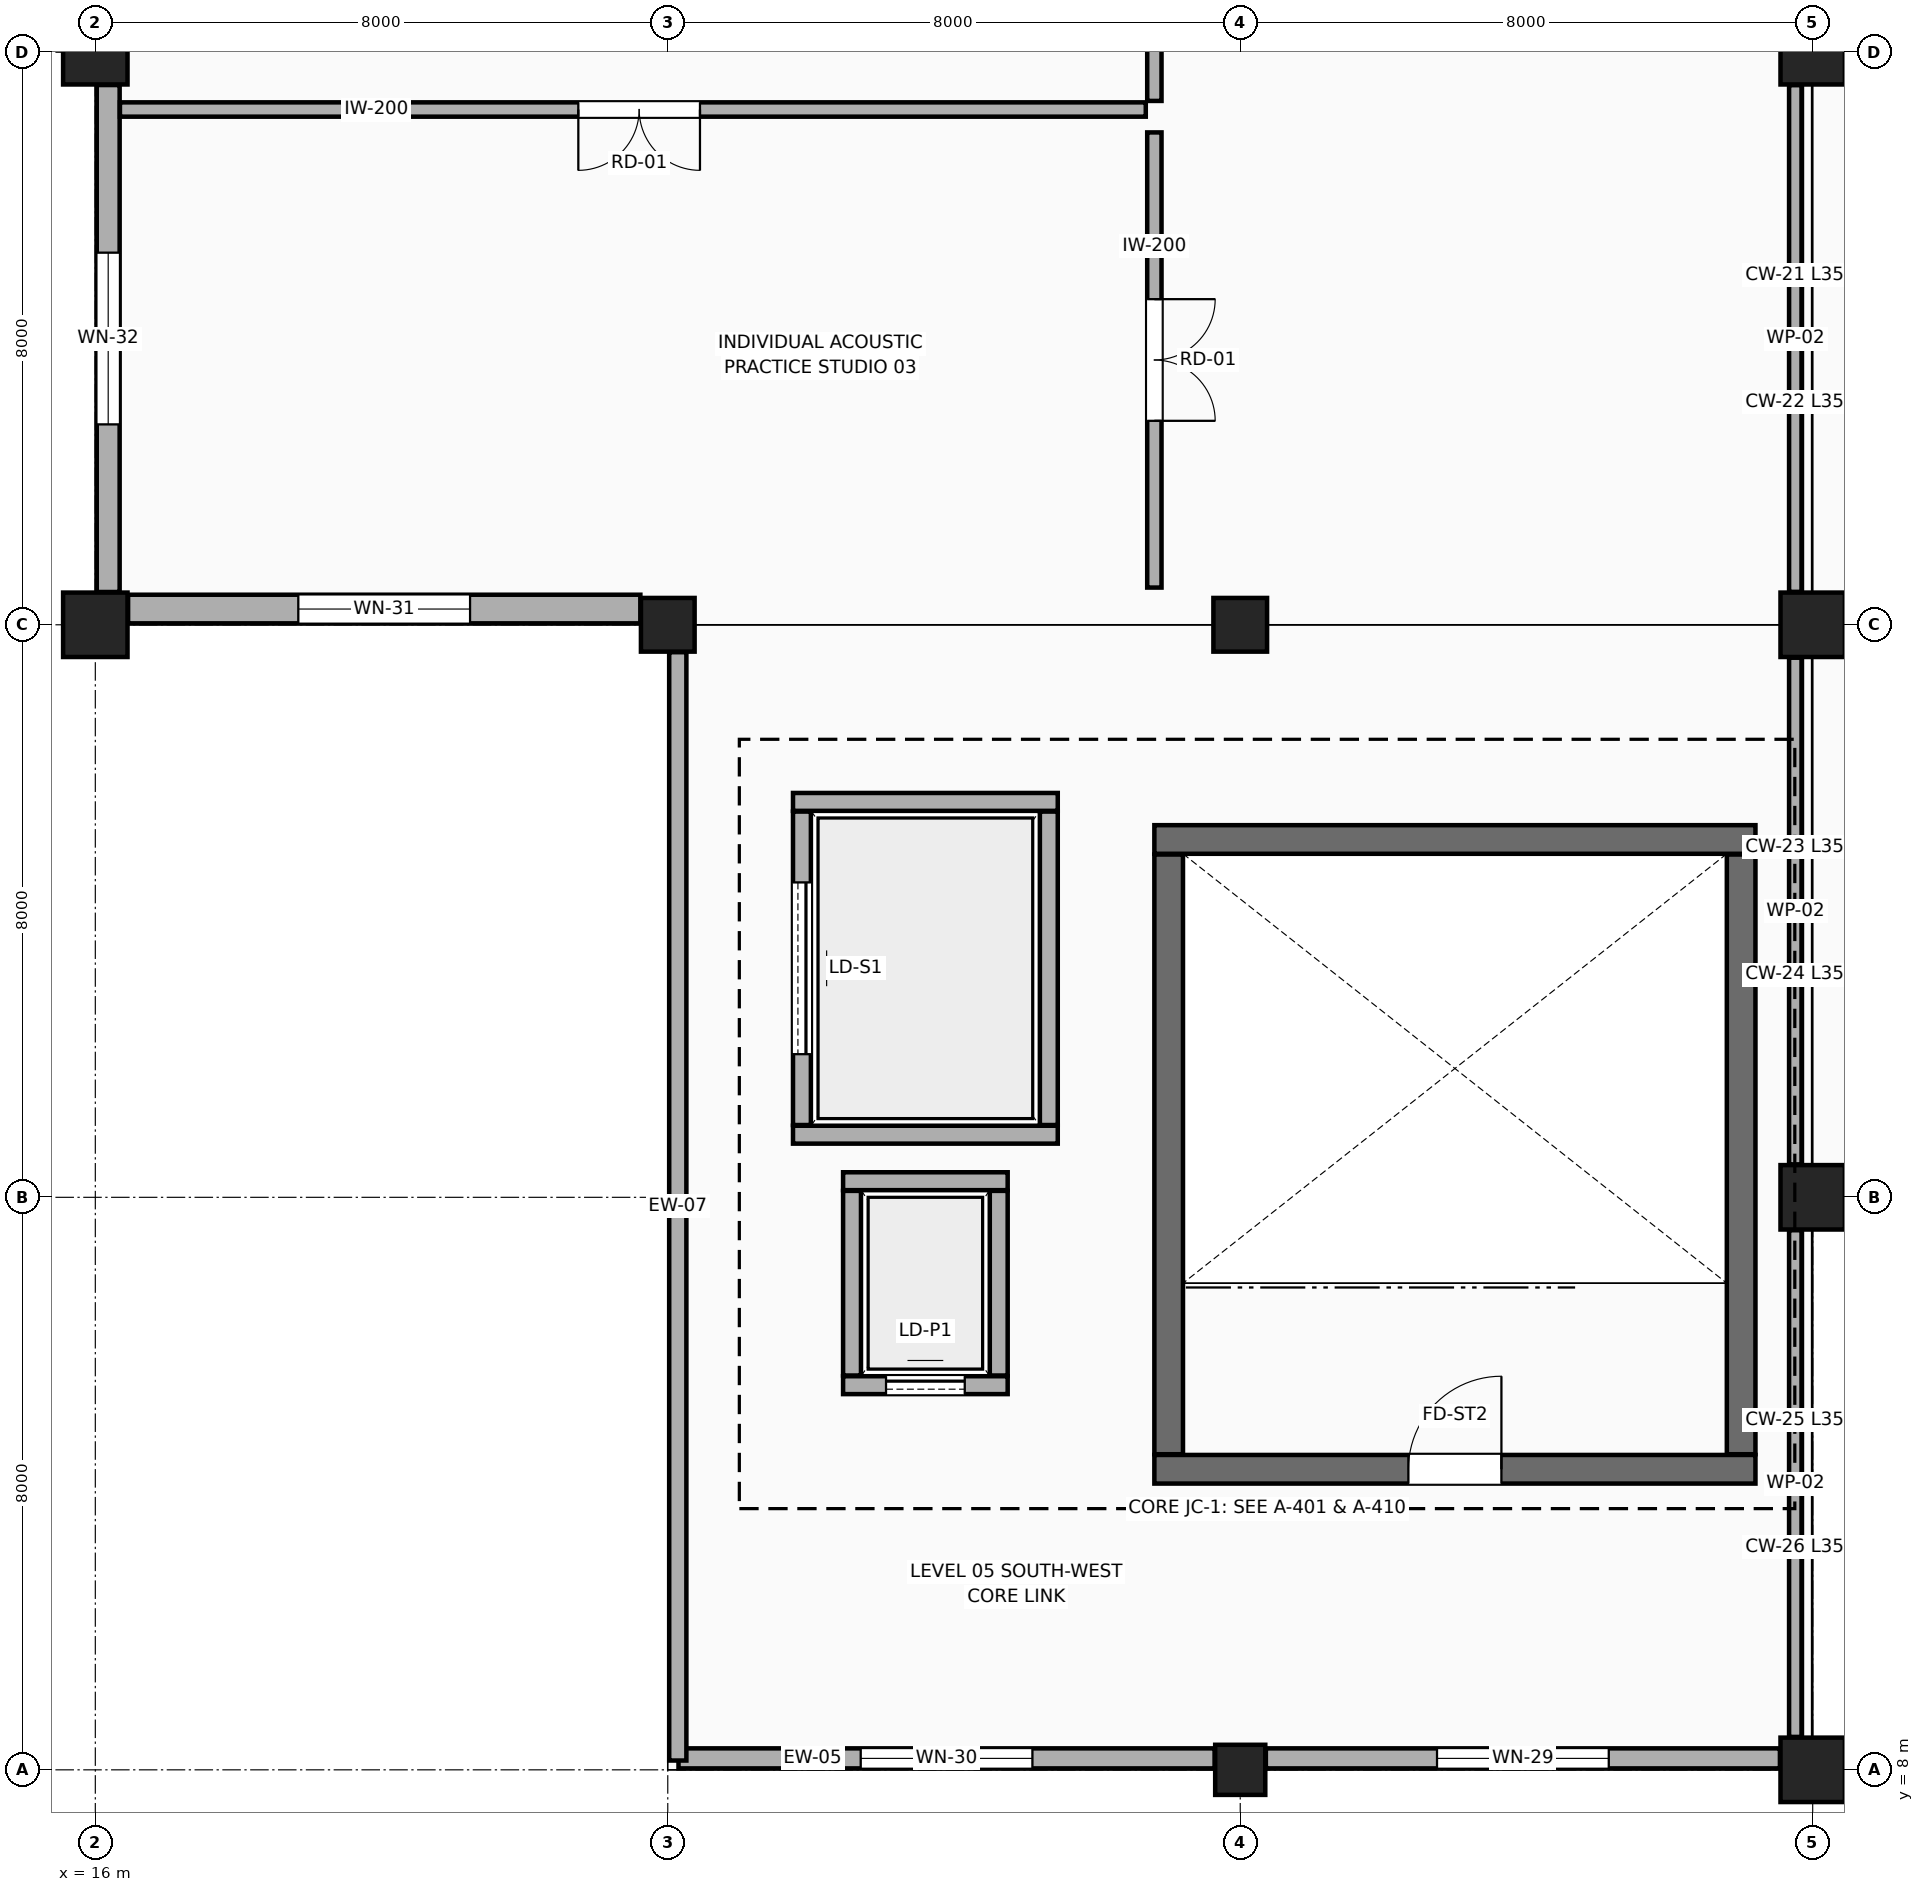
"""IFC4 building model, lengths in metres.
Left out: names, types, materials, properties, quantities, classifications, styles, units other than length and angle.
Written with IfcOpenShell. Run it as: python <this file> out.ifc"""

import sys

from ifc_helpers import new_model, si_unit, direction, frame, frame_2d, origin, origin_2d, place, context, subcontext, project, spatial, rectangle, circle, extrude, element, fill, save


model = new_model("IFC4")
c1 = context("Model", 3, precision=1e-05, world=origin(), true_north=direction((0.0, 1.0)))
c2 = subcontext(c1, "Body", "Model", "MODEL_VIEW")
j1 = project(units=[si_unit("LENGTHUNIT", "METRE"), si_unit("PLANEANGLEUNIT", "RADIAN")], contexts=[c1])
p1 = place(None, origin())
s1 = spatial("IfcSite", under=j1, at=p1, CompositionType="ELEMENT")
p2 = place(p1, origin())
s2 = spatial("IfcBuilding", under=s1, at=p2, CompositionType="ELEMENT")
p3 = place(p2, frame((0.0, 0.0, 19.8)))
s3 = spatial("IfcBuildingStorey", under=s2, at=p3, CompositionType="ELEMENT", Elevation=19.8)
for number, where, z_axis, x_axis in (
    (1, (16.0, 24.0, 0.0), (0.0, 0.0, 1.0), (1.0, 0.0, 0.0)),
    (2, (16.0, 32.0, 0.0), (0.0, 0.0, 1.0), (1.0, 0.0, 0.0)),
):
    element("IfcColumn", number, at=place(p3, frame(where, z_axis=z_axis, x_axis=x_axis)), inside=s3, PredefinedType="COLUMN", context=c2, shape_type="SweptSolid", body=[
        extrude(rectangle(XDim=0.9, YDim=0.9, at=origin_2d()), origin(), (0.0, 0.0, 1.0), 4.5),
    ])
p4 = place(p3, frame((24.0, 24.0, 0.0), z_axis=(0.0, 0.0, 1.0), x_axis=(1.0, 0.0, 0.0)))
e3 = element("IfcColumn", 3, at=p4, inside=s3, PredefinedType="COLUMN", context=c2, shape_type="SweptSolid", body=[
    extrude(rectangle(XDim=0.75, YDim=0.75, at=origin_2d()), origin(), (0.0, 0.0, 1.0), 4.5),
])
p5 = place(p3, frame((32.0, 8.0, 0.0), z_axis=(0.0, 0.0, 1.0), x_axis=(1.0, 0.0, 0.0)))
e4 = element("IfcColumn", 4, at=p5, inside=s3, PredefinedType="COLUMN", context=c2, shape_type="SweptSolid", body=[
    extrude(circle(Radius=0.35, at=origin_2d()), origin(), (0.0, 0.0, 1.0), 4.46),
])
p6 = place(p3, frame((32.0, 24.0, 0.0), z_axis=(0.0, 0.0, 1.0), x_axis=(1.0, 0.0, 0.0)))
e5 = element("IfcColumn", 5, at=p6, inside=s3, PredefinedType="COLUMN", context=c2, shape_type="SweptSolid", body=[
    extrude(rectangle(XDim=0.75, YDim=0.75, at=origin_2d()), origin(), (0.0, 0.0, 1.0), 4.5),
])
for number, where, z_axis, x_axis in (
    (6, (40.0, 8.0, 0.0), (0.0, 0.0, 1.0), (1.0, 0.0, 0.0)),
    (7, (40.0, 16.0, 0.0), (0.0, 0.0, 1.0), (1.0, 0.0, 0.0)),
):
    element("IfcColumn", number, at=place(p3, frame(where, z_axis=z_axis, x_axis=x_axis)), inside=s3, PredefinedType="COLUMN", context=c2, shape_type="SweptSolid", body=[
        extrude(rectangle(XDim=0.9, YDim=0.9, at=origin_2d()), origin(), (0.0, 0.0, 1.0), 4.46),
    ])
for number, where, z_axis, x_axis in (
    (8, (40.0, 24.0, 0.0), (0.0, 0.0, 1.0), (1.0, 0.0, 0.0)),
    (9, (40.0, 32.0, 0.0), (0.0, 0.0, 1.0), (1.0, 0.0, 0.0)),
):
    element("IfcColumn", number, at=place(p3, frame(where, z_axis=z_axis, x_axis=x_axis)), inside=s3, PredefinedType="COLUMN", context=c2, shape_type="SweptSolid", body=[
        extrude(rectangle(XDim=0.9, YDim=0.9, at=origin_2d()), origin(), (0.0, 0.0, 1.0), 4.5),
    ])
for number, where, z_axis, x_axis in (
    (10, (39.76, 31.54, 0.0), (0.0, 0.0, 1.0), (0.0, -1.0, 0.0)),
    (11, (39.76, 23.54, 0.0), (0.0, 0.0, 1.0), (0.0, -1.0, 0.0)),
    (12, (39.76, 15.54, 0.0), (0.0, 0.0, 1.0), (0.0, -1.0, 0.0)),
):
    element("IfcWall", number, at=place(p3, frame(where, z_axis=z_axis, x_axis=x_axis)), inside=s3, PredefinedType="PARAPET", context=c2, shape_type="SweptSolid", body=[
        extrude(rectangle(XDim=7.08, YDim=0.18, at=frame_2d((3.54, 0.0))), origin(), (0.0, 0.0, 1.0), 0.88),
    ])
p7 = place(p3, frame((39.542, 8.16, 0.0), z_axis=(0.0, 0.0, 1.0), x_axis=(-1.0, 0.0, 0.0)))
e13 = element("IfcWall", 13, at=p7, inside=s3, PredefinedType="STANDARD", context=c2, shape_type="SweptSolid", body=[
    extrude(rectangle(XDim=7.184, YDim=0.28, at=frame_2d((3.592, 0.0))), origin(), (0.0, 0.0, 1.0), 3.485),
])
p8 = place(p7, frame((2.392, 0.0, 0.95)))
e14 = element("IfcOpeningElement", 14, at=p8, cuts=e13, PredefinedType="OPENING", context=c2, shape_type="SweptSolid", body=[
    extrude(rectangle(XDim=2.4, YDim=1.2, at=frame_2d((1.2, 0.6))), frame((0.0, 0.15, 0.0), z_axis=(0.0, -1.0, 0.0), x_axis=(1.0, 0.0, 0.0)), (0.0, 0.0, 1.0), 0.3),
])
p9 = place(p3, frame((31.642, 8.16, 0.0), z_axis=(0.0, 0.0, 1.0), x_axis=(-1.0, 0.0, 0.0)))
e15 = element("IfcWall", 15, at=p9, inside=s3, PredefinedType="STANDARD", context=c2, shape_type="SweptSolid", body=[
    extrude(rectangle(XDim=7.492, YDim=0.28, at=frame_2d((3.746, 0.0))), origin(), (0.0, 0.0, 1.0), 4.28),
])
p10 = place(p9, frame((2.546, 0.0, 0.95)))
e16 = element("IfcOpeningElement", 16, at=p10, cuts=e15, PredefinedType="OPENING", context=c2, shape_type="SweptSolid", body=[
    extrude(rectangle(XDim=2.4, YDim=1.5, at=frame_2d((1.2, 0.75))), frame((0.0, 0.15, 0.0), z_axis=(0.0, -1.0, 0.0), x_axis=(1.0, 0.0, 0.0)), (0.0, 0.0, 1.0), 0.3),
])
p11 = place(p3, frame((24.14, 8.13, 0.0), z_axis=(0.0, 0.0, 1.0), x_axis=(0.0, 1.0, 0.0)))
e17 = element("IfcWall", 17, at=p11, inside=s3, PredefinedType="ELEMENTEDWALL", context=c2, shape_type="SweptSolid", body=[
    extrude(rectangle(XDim=15.487, YDim=0.24, at=frame_2d((7.744, 0.0))), origin(), (0.0, 0.0, 1.0), 4.28),
])
p12 = place(p3, frame((23.617, 24.22, 0.0), z_axis=(0.0, 0.0, 1.0), x_axis=(-1.0, 0.0, 0.0)))
e18 = element("IfcWall", 18, at=p12, inside=s3, PredefinedType="STANDARD", context=c2, shape_type="SweptSolid", body=[
    extrude(rectangle(XDim=7.159, YDim=0.4, at=frame_2d((3.58, 0.0))), origin(), (0.0, 0.0, 1.0), 3.735),
])
p13 = place(p12, frame((2.38, 0.0, 0.95)))
e19 = element("IfcOpeningElement", 19, at=p13, cuts=e18, PredefinedType="OPENING", context=c2, shape_type="SweptSolid", body=[
    extrude(rectangle(XDim=2.4, YDim=1.8, at=frame_2d((1.2, 0.9))), frame((0.0, 0.21, 0.0), z_axis=(0.0, -1.0, 0.0), x_axis=(1.0, 0.0, 0.0)), (0.0, 0.0, 1.0), 0.42),
])
p14 = place(p3, frame((16.18, 24.458, 0.0), z_axis=(0.0, 0.0, 1.0), x_axis=(0.0, 1.0, 0.0)))
e20 = element("IfcWall", 20, at=p14, inside=s3, PredefinedType="STANDARD", context=c2, shape_type="SweptSolid", body=[
    extrude(rectangle(XDim=7.084, YDim=0.32, at=frame_2d((3.542, 0.0))), origin(), (0.0, 0.0, 1.0), 3.635),
])
p15 = place(p14, frame((2.342, 0.0, 0.95)))
e21 = element("IfcOpeningElement", 21, at=p15, cuts=e20, PredefinedType="OPENING", context=c2, shape_type="SweptSolid", body=[
    extrude(rectangle(XDim=2.4, YDim=2.1, at=frame_2d((1.2, 1.05))), frame((0.0, 0.17, 0.0), z_axis=(0.0, -1.0, 0.0), x_axis=(1.0, 0.0, 0.0)), (0.0, 0.0, 1.0), 0.34),
])
p16 = place(p3, frame((30.8, 12.2, 0.0), z_axis=(0.0, 0.0, 1.0), x_axis=(1.0, 0.0, 0.0)))
e22 = element("IfcWall", 22, at=p16, inside=s3, PredefinedType="SHEAR", context=c2, shape_type="SweptSolid", body=[
    extrude(rectangle(XDim=8.4, YDim=0.4, at=frame_2d((4.2, 0.0))), origin(), (0.0, 0.0, 1.0), 4.28),
])
p17 = place(p16, frame((3.55, 0.0, 0.0)))
e23 = element("IfcOpeningElement", 23, at=p17, cuts=e22, PredefinedType="OPENING", context=c2, shape_type="SweptSolid", body=[
    extrude(rectangle(XDim=1.3, YDim=2.15, at=frame_2d((0.65, 1.075))), frame((0.0, 0.21, 0.0), z_axis=(0.0, -1.0, 0.0), x_axis=(1.0, 0.0, 0.0)), (0.0, 0.0, 1.0), 0.42),
])
p18 = place(p3, frame((39.2, 21.0, 0.0), z_axis=(0.0, 0.0, 1.0), x_axis=(-1.0, 0.0, 0.0)))
e24 = element("IfcWall", 24, at=p18, inside=s3, PredefinedType="SHEAR", context=c2, shape_type="SweptSolid", body=[
    extrude(rectangle(XDim=8.4, YDim=0.4, at=frame_2d((4.2, 0.0))), origin(), (0.0, 0.0, 1.0), 4.28),
])
for number, where, z_axis, x_axis in (
    (25, (39.0, 12.41, 0.0), (0.0, 0.0, 1.0), (0.0, 1.0, 0.0)),
    (26, (31.0, 20.79, 0.0), (0.0, 0.0, 1.0), (0.0, -1.0, 0.0)),
):
    element("IfcWall", number, at=place(p3, frame(where, z_axis=z_axis, x_axis=x_axis)), inside=s3, PredefinedType="SHEAR", context=c2, shape_type="SweptSolid", body=[
        extrude(rectangle(XDim=8.38, YDim=0.4, at=frame_2d((4.19, 0.0))), origin(), (0.0, 0.0, 1.0), 4.28),
    ])
p19 = place(p3, frame((26.45, 13.375, 0.0), z_axis=(0.0, 0.0, 1.0), x_axis=(1.0, 0.0, 0.0)))
e27 = element("IfcWall", 27, at=p19, inside=s3, PredefinedType="STANDARD", context=c2, shape_type="SweptSolid", body=[
    extrude(rectangle(XDim=2.3, YDim=0.25, at=frame_2d((1.15, 0.0))), origin(), (0.0, 0.0, 1.0), 4.27),
])
p20 = place(p19, frame((0.6, 0.0, 0.0)))
e28 = element("IfcOpeningElement", 28, at=p20, cuts=e27, PredefinedType="OPENING", context=c2, shape_type="SweptSolid", body=[
    extrude(rectangle(XDim=1.1, YDim=2.15, at=frame_2d((0.55, 1.075))), frame((0.0, 0.135, 0.0), z_axis=(0.0, -1.0, 0.0), x_axis=(1.0, 0.0, 0.0)), (0.0, 0.0, 1.0), 0.27),
])
p21 = place(p3, frame((28.75, 16.225, 0.0), z_axis=(0.0, 0.0, 1.0), x_axis=(-1.0, 0.0, 0.0)))
e29 = element("IfcWall", 29, at=p21, inside=s3, PredefinedType="STANDARD", context=c2, shape_type="SweptSolid", body=[
    extrude(rectangle(XDim=2.3, YDim=0.25, at=frame_2d((1.15, 0.0))), origin(), (0.0, 0.0, 1.0), 4.27),
])
for number, where, z_axis, x_axis in (
    (30, (28.625, 13.51, 0.0), (0.0, 0.0, 1.0), (0.0, 1.0, 0.0)),
    (31, (26.575, 16.09, 0.0), (0.0, 0.0, 1.0), (0.0, -1.0, 0.0)),
):
    element("IfcWall", number, at=place(p3, frame(where, z_axis=z_axis, x_axis=x_axis)), inside=s3, PredefinedType="STANDARD", context=c2, shape_type="SweptSolid", body=[
        extrude(rectangle(XDim=2.58, YDim=0.25, at=frame_2d((1.29, 0.0))), origin(), (0.0, 0.0, 1.0), 4.27),
    ])
for number, where, z_axis, x_axis in (
    (32, (25.75, 16.875, 0.0), (0.0, 0.0, 1.0), (1.0, 0.0, 0.0)),
    (33, (29.45, 21.525, 0.0), (0.0, 0.0, 1.0), (-1.0, 0.0, 0.0)),
):
    element("IfcWall", number, at=place(p3, frame(where, z_axis=z_axis, x_axis=x_axis)), inside=s3, PredefinedType="STANDARD", context=c2, shape_type="SweptSolid", body=[
        extrude(rectangle(XDim=3.7, YDim=0.25, at=frame_2d((1.85, 0.0))), origin(), (0.0, 0.0, 1.0), 4.27),
    ])
p22 = place(p3, frame((29.325, 17.01, 0.0), z_axis=(0.0, 0.0, 1.0), x_axis=(0.0, 1.0, 0.0)))
e34 = element("IfcWall", 34, at=p22, inside=s3, PredefinedType="STANDARD", context=c2, shape_type="SweptSolid", body=[
    extrude(rectangle(XDim=4.38, YDim=0.25, at=frame_2d((2.19, 0.0))), origin(), (0.0, 0.0, 1.0), 4.27),
])
p23 = place(p3, frame((25.875, 21.39, 0.0), z_axis=(0.0, 0.0, 1.0), x_axis=(0.0, -1.0, 0.0)))
e35 = element("IfcWall", 35, at=p23, inside=s3, PredefinedType="STANDARD", context=c2, shape_type="SweptSolid", body=[
    extrude(rectangle(XDim=4.38, YDim=0.25, at=frame_2d((2.19, 0.0))), origin(), (0.0, 0.0, 1.0), 4.27),
])
p24 = place(p23, frame((0.99, 0.0, 0.0)))
e36 = element("IfcOpeningElement", 36, at=p24, cuts=e35, PredefinedType="OPENING", context=c2, shape_type="SweptSolid", body=[
    extrude(rectangle(XDim=2.4, YDim=2.55, at=frame_2d((1.2, 1.275))), frame((0.0, 0.135, 0.0), z_axis=(0.0, -1.0, 0.0), x_axis=(1.0, 0.0, 0.0)), (0.0, 0.0, 1.0), 0.27),
])
p25 = place(p3, frame((30.8, 50.48, 0.0), z_axis=(0.0, 0.0, 1.0), x_axis=(0.0, -1.0, 0.0)))
e37 = element("IfcWall", 37, at=p25, inside=s3, PredefinedType="PARTITIONING", context=c2, shape_type="SweptSolid", body=[
    extrude(rectangle(XDim=19.16, YDim=0.2, at=frame_2d((9.58, 0.0))), origin(), (0.0, 0.0, 1.0), 4.5),
])
p26 = place(p25, frame((8.73, 0.0, 0.0)))
e38 = element("IfcOpeningElement", 38, at=p26, cuts=e37, PredefinedType="OPENING", context=c2, shape_type="SweptSolid", body=[
    extrude(rectangle(XDim=1.7, YDim=2.25, at=frame_2d((0.85, 1.125))), frame((0.0, 0.11, 0.0), z_axis=(0.0, -1.0, 0.0), x_axis=(1.0, 0.0, 0.0)), (0.0, 0.0, 1.0), 0.22),
])
p27 = place(p3, frame((30.68, 31.2, 0.0), z_axis=(0.0, 0.0, 1.0), x_axis=(-1.0, 0.0, 0.0)))
e39 = element("IfcWall", 39, at=p27, inside=s3, PredefinedType="PARTITIONING", context=c2, shape_type="SweptSolid", body=[
    extrude(rectangle(XDim=14.336, YDim=0.2, at=frame_2d((7.168, 0.0))), origin(), (0.0, 0.0, 1.0), 4.5),
])
p28 = place(p27, frame((6.23, 0.0, 0.0)))
e40 = element("IfcOpeningElement", 40, at=p28, cuts=e39, PredefinedType="OPENING", context=c2, shape_type="SweptSolid", body=[
    extrude(rectangle(XDim=1.7, YDim=2.25, at=frame_2d((0.85, 1.125))), frame((0.0, 0.11, 0.0), z_axis=(0.0, -1.0, 0.0), x_axis=(1.0, 0.0, 0.0)), (0.0, 0.0, 1.0), 0.22),
])
p29 = place(p3, frame((30.8, 30.88, 0.0), z_axis=(0.0, 0.0, 1.0), x_axis=(0.0, -1.0, 0.0)))
e41 = element("IfcWall", 41, at=p29, inside=s3, PredefinedType="PARTITIONING", context=c2, shape_type="SweptSolid", body=[
    extrude(rectangle(XDim=6.36, YDim=0.2, at=frame_2d((3.18, 0.0))), origin(), (0.0, 0.0, 1.0), 4.5),
])
p30 = place(p29, frame((2.33, 0.0, 0.0)))
e42 = element("IfcOpeningElement", 42, at=p30, cuts=e41, PredefinedType="OPENING", context=c2, shape_type="SweptSolid", body=[
    extrude(rectangle(XDim=1.7, YDim=2.25, at=frame_2d((0.85, 1.125))), frame((0.0, 0.11, 0.0), z_axis=(0.0, -1.0, 0.0), x_axis=(1.0, 0.0, 0.0)), (0.0, 0.0, 1.0), 0.22),
])
p31 = place(p8, origin())
e43 = element("IfcWindow", 43, at=p31, inside=s3, PartitioningType="SINGLE_PANEL", PredefinedType="SKYLIGHT", context=c2, shape_type="SweptSolid", body=[
    extrude(rectangle(XDim=2.4, YDim=1.2, at=frame_2d((1.2, 0.6))), frame((0.0, 0.03, 0.0), z_axis=(0.0, -1.0, 0.0), x_axis=(1.0, 0.0, 0.0)), (0.0, 0.0, 1.0), 0.06),
])
fill(e14, e43)
p32 = place(p10, origin())
e44 = element("IfcWindow", 44, at=p32, inside=s3, PartitioningType="SINGLE_PANEL", PredefinedType="SKYLIGHT", context=c2, shape_type="SweptSolid", body=[
    extrude(rectangle(XDim=2.4, YDim=1.5, at=frame_2d((1.2, 0.75))), frame((0.0, 0.03, 0.0), z_axis=(0.0, -1.0, 0.0), x_axis=(1.0, 0.0, 0.0)), (0.0, 0.0, 1.0), 0.06),
])
fill(e16, e44)
p33 = place(p13, origin())
e45 = element("IfcWindow", 45, at=p33, inside=s3, PartitioningType="SINGLE_PANEL", PredefinedType="SKYLIGHT", context=c2, shape_type="SweptSolid", body=[
    extrude(rectangle(XDim=2.4, YDim=1.8, at=frame_2d((1.2, 0.9))), frame((0.0, 0.03, 0.0), z_axis=(0.0, -1.0, 0.0), x_axis=(1.0, 0.0, 0.0)), (0.0, 0.0, 1.0), 0.06),
])
fill(e19, e45)
p34 = place(p15, origin())
e46 = element("IfcWindow", 46, at=p34, inside=s3, PartitioningType="SINGLE_PANEL", PredefinedType="SKYLIGHT", context=c2, shape_type="SweptSolid", body=[
    extrude(rectangle(XDim=2.4, YDim=2.1, at=frame_2d((1.2, 1.05))), frame((0.0, 0.03, 0.0), z_axis=(0.0, -1.0, 0.0), x_axis=(1.0, 0.0, 0.0)), (0.0, 0.0, 1.0), 0.06),
])
fill(e21, e46)
p35 = place(p17, origin())
e47 = element("IfcDoor", 47, at=p35, inside=s3, OperationType="SINGLE_SWING_RIGHT", PredefinedType="DOOR", context=c2, shape_type="SweptSolid", body=[
    extrude(rectangle(XDim=1.3, YDim=2.15, at=frame_2d((0.65, 1.075))), frame((0.0, 0.025, 0.0), z_axis=(0.0, -1.0, 0.0), x_axis=(1.0, 0.0, 0.0)), (0.0, 0.0, 1.0), 0.05),
])
fill(e23, e47)
p36 = place(p20, origin())
e48 = element("IfcDoor", 48, at=p36, inside=s3, OperationType="DOUBLE_DOOR_SLIDING", PredefinedType="DOOR", context=c2, shape_type="SweptSolid", body=[
    extrude(rectangle(XDim=1.1, YDim=2.15, at=frame_2d((0.55, 1.075))), frame((0.0, 0.025, 0.0), z_axis=(0.0, -1.0, 0.0), x_axis=(1.0, 0.0, 0.0)), (0.0, 0.0, 1.0), 0.05),
])
fill(e28, e48)
p37 = place(p24, origin())
e49 = element("IfcDoor", 49, at=p37, inside=s3, OperationType="DOUBLE_DOOR_SLIDING", PredefinedType="DOOR", context=c2, shape_type="SweptSolid", body=[
    extrude(rectangle(XDim=2.4, YDim=2.55, at=frame_2d((1.2, 1.275))), frame((0.0, 0.025, 0.0), z_axis=(0.0, -1.0, 0.0), x_axis=(1.0, 0.0, 0.0)), (0.0, 0.0, 1.0), 0.05),
])
fill(e36, e49)
p38 = place(p28, origin())
e50 = element("IfcDoor", 50, at=p38, inside=s3, OperationType="DOUBLE_DOOR_SINGLE_SWING", PredefinedType="DOOR", context=c2, shape_type="SweptSolid", body=[
    extrude(rectangle(XDim=1.7, YDim=2.25, at=frame_2d((0.85, 1.125))), frame((0.0, 0.025, 0.0), z_axis=(0.0, -1.0, 0.0), x_axis=(1.0, 0.0, 0.0)), (0.0, 0.0, 1.0), 0.05),
])
fill(e40, e50)
p39 = place(p30, origin())
e51 = element("IfcDoor", 51, at=p39, inside=s3, OperationType="DOUBLE_DOOR_SINGLE_SWING", PredefinedType="DOOR", context=c2, shape_type="SweptSolid", body=[
    extrude(rectangle(XDim=1.7, YDim=2.25, at=frame_2d((0.85, 1.125))), frame((0.0, 0.025, 0.0), z_axis=(0.0, -1.0, 0.0), x_axis=(1.0, 0.0, 0.0)), (0.0, 0.0, 1.0), 0.05),
])
fill(e42, e51)
save(model, sys.argv[1])
